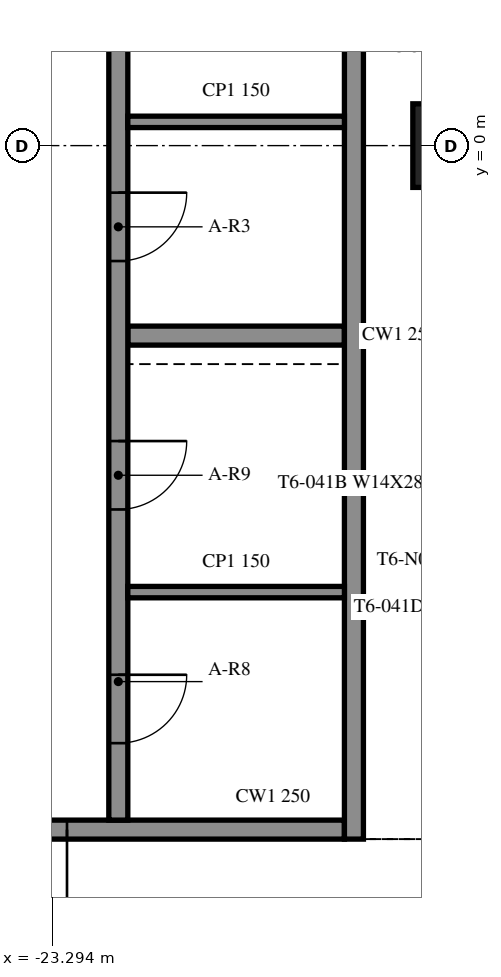
"""IFC4 building model, lengths in metres.
Left out: names, types, materials, properties, quantities, classifications, styles, units other than length and angle.
Written with IfcOpenShell. Run it as: python <this file> out.ifc"""

import sys

from ifc_helpers import new_model, si_unit, direction, frame, frame_2d, origin, origin_2d, place, context, subcontext, project, spatial, rectangle, extrude, element, fill, save


model = new_model("IFC4")
c1 = context("Model", 3, precision=1e-05, world=origin(), true_north=direction((0.0, 1.0)))
c2 = subcontext(c1, "Body", "Model", "MODEL_VIEW")
j1 = project(units=[si_unit("LENGTHUNIT", "METRE"), si_unit("PLANEANGLEUNIT", "RADIAN")], contexts=[c1])
p1 = place(None, origin())
s1 = spatial("IfcSite", under=j1, at=p1, CompositionType="ELEMENT")
p2 = place(p1, origin())
s2 = spatial("IfcBuilding", under=s1, at=p2, CompositionType="ELEMENT")
p3 = place(p2, frame((0.0, 0.0, 224.3)))
s3 = spatial("IfcBuildingStorey", under=s2, at=p3, CompositionType="ELEMENT", Elevation=224.3)
p4 = place(p3, frame((-18.0, 0.0, -0.4), z_axis=(0.0, 0.0, 1.0), x_axis=(1.0, 0.0, 0.0)))
e1 = element("IfcColumn", 1, at=p4, inside=s3, PredefinedType="COLUMN", context=c2, shape_type="SweptSolid", body=[
    extrude(rectangle(XDim=1.1, YDim=1.1, at=origin_2d()), origin(), (0.0, 0.0, 1.0), 4.36),
])
p5 = place(p3, frame((-19.325, -9.125, 0.0), z_axis=(0.0, 0.0, 1.0), x_axis=(0.0, 1.0, 0.0)))
e2 = element("IfcWall", 2, at=p5, inside=s3, PredefinedType="SOLIDWALL", context=c2, shape_type="SweptSolid", body=[
    extrude(rectangle(XDim=24.25, YDim=0.25, at=frame_2d((12.125, 0.0))), origin(), (0.0, 0.0, 1.0), 3.96),
])
p6 = place(p3, frame((-19.45, -9.0, 0.0), z_axis=(0.0, 0.0, 1.0), x_axis=(-1.0, 0.0, 0.0)))
e3 = element("IfcWall", 3, at=p6, inside=s3, PredefinedType="SOLIDWALL", context=c2, shape_type="SweptSolid", body=[
    extrude(rectangle(XDim=9.1, YDim=0.25, at=frame_2d((4.55, 0.0))), origin(), (0.0, 0.0, 1.0), 3.96),
])
p7 = place(p6, frame((3.65, 0.0, 0.0)))
e4 = element("IfcOpeningElement", 4, at=p7, cuts=e3, PredefinedType="OPENING", context=c2, shape_type="SweptSolid", body=[
    extrude(rectangle(XDim=1.8, YDim=2.1, at=frame_2d((0.9, 1.05))), frame((0.0, 0.135, 0.0), z_axis=(0.0, -1.0, 0.0), x_axis=(1.0, 0.0, 0.0)), (0.0, 0.0, 1.0), 0.27),
])
p8 = place(p3, frame((-22.425, 14.875, 0.0), z_axis=(0.0, 0.0, 1.0), x_axis=(0.0, -1.0, 0.0)))
e5 = element("IfcWall", 5, at=p8, inside=s3, PredefinedType="SOLIDWALL", context=c2, shape_type="SweptSolid", body=[
    extrude(rectangle(XDim=23.75, YDim=0.25, at=frame_2d((11.875, 0.0))), origin(), (0.0, 0.0, 1.0), 3.96),
])
p9 = place(p8, frame((15.494, 0.0, 0.0)))
e6 = element("IfcOpeningElement", 6, at=p9, cuts=e5, PredefinedType="OPENING", context=c2, shape_type="SweptSolid", body=[
    extrude(rectangle(XDim=0.9, YDim=2.1, at=frame_2d((0.45, 1.05))), frame((0.0, 0.135, 0.0), z_axis=(0.0, -1.0, 0.0), x_axis=(1.0, 0.0, 0.0)), (0.0, 0.0, 1.0), 0.27),
])
p10 = place(p8, frame((11.425, 0.0, 0.0)))
e7 = element("IfcOpeningElement", 7, at=p10, cuts=e5, PredefinedType="OPENING", context=c2, shape_type="SweptSolid", body=[
    extrude(rectangle(XDim=0.9, YDim=2.1, at=frame_2d((0.45, 1.05))), frame((0.0, 0.135, 0.0), z_axis=(0.0, -1.0, 0.0), x_axis=(1.0, 0.0, 0.0)), (0.0, 0.0, 1.0), 0.27),
])
p11 = place(p8, frame((7.356, 0.0, 0.0)))
e8 = element("IfcOpeningElement", 8, at=p11, cuts=e5, PredefinedType="OPENING", context=c2, shape_type="SweptSolid", body=[
    extrude(rectangle(XDim=0.9, YDim=2.1, at=frame_2d((0.45, 1.05))), frame((0.0, 0.135, 0.0), z_axis=(0.0, -1.0, 0.0), x_axis=(1.0, 0.0, 0.0)), (0.0, 0.0, 1.0), 0.27),
])
p12 = place(p8, frame((21.837, 0.0, 0.0)))
e9 = element("IfcOpeningElement", 9, at=p12, cuts=e5, PredefinedType="OPENING", context=c2, shape_type="SweptSolid", body=[
    extrude(rectangle(XDim=0.9, YDim=2.1, at=frame_2d((0.45, 1.05))), frame((0.0, 0.135, 0.0), z_axis=(0.0, -1.0, 0.0), x_axis=(1.0, 0.0, 0.0)), (0.0, 0.0, 1.0), 0.27),
])
p13 = place(p8, frame((18.762, 0.0, 0.0)))
e10 = element("IfcOpeningElement", 10, at=p13, cuts=e5, PredefinedType="OPENING", context=c2, shape_type="SweptSolid", body=[
    extrude(rectangle(XDim=0.9, YDim=2.1, at=frame_2d((0.45, 1.05))), frame((0.0, 0.135, 0.0), z_axis=(0.0, -1.0, 0.0), x_axis=(1.0, 0.0, 0.0)), (0.0, 0.0, 1.0), 0.27),
])
p14 = place(p8, frame((4.587, 0.0, 0.0)))
e11 = element("IfcOpeningElement", 11, at=p14, cuts=e5, PredefinedType="OPENING", context=c2, shape_type="SweptSolid", body=[
    extrude(rectangle(XDim=0.9, YDim=2.1, at=frame_2d((0.45, 1.05))), frame((0.0, 0.135, 0.0), z_axis=(0.0, -1.0, 0.0), x_axis=(1.0, 0.0, 0.0)), (0.0, 0.0, 1.0), 0.27),
])
p15 = place(p8, frame((2.55, 0.0, 0.0)))
e12 = element("IfcOpeningElement", 12, at=p15, cuts=e5, PredefinedType="OPENING", context=c2, shape_type="SweptSolid", body=[
    extrude(rectangle(XDim=0.9, YDim=2.1, at=frame_2d((0.45, 1.05))), frame((0.0, 0.135, 0.0), z_axis=(0.0, -1.0, 0.0), x_axis=(1.0, 0.0, 0.0)), (0.0, 0.0, 1.0), 0.27),
])
p16 = place(p8, frame((0.512, 0.0, 0.0)))
e13 = element("IfcOpeningElement", 13, at=p16, cuts=e5, PredefinedType="OPENING", context=c2, shape_type="SweptSolid", body=[
    extrude(rectangle(XDim=0.9, YDim=2.1, at=frame_2d((0.45, 1.05))), frame((0.0, 0.135, 0.0), z_axis=(0.0, -1.0, 0.0), x_axis=(1.0, 0.0, 0.0)), (0.0, 0.0, 1.0), 0.27),
])
p17 = place(p3, frame((-22.3, -2.5, 0.0), z_axis=(0.0, 0.0, 1.0), x_axis=(1.0, 0.0, 0.0)))
e14 = element("IfcWall", 14, at=p17, inside=s3, PredefinedType="SOLIDWALL", context=c2, shape_type="SweptSolid", body=[
    extrude(rectangle(XDim=2.85, YDim=0.25, at=frame_2d((1.425, 0.0))), origin(), (0.0, 0.0, 1.0), 3.96),
])
for number, where, z_axis, x_axis in (
    (15, (-22.3, 0.312, 0.0), (0.0, 0.0, 1.0), (1.0, 0.0, 0.0)),
    (16, (-22.3, -5.875, 0.0), (0.0, 0.0, 1.0), (1.0, 0.0, 0.0)),
):
    element("IfcWall", number, at=place(p3, frame(where, z_axis=z_axis, x_axis=x_axis)), inside=s3, PredefinedType="PARTITIONING", context=c2, shape_type="SweptSolid", body=[
        extrude(rectangle(XDim=2.85, YDim=0.15, at=frame_2d((1.425, 0.0))), origin(), (0.0, 0.0, 1.0), 3.96),
    ])
p18 = place(p7, origin())
e17 = element("IfcDoor", 17, at=p18, inside=s3, OperationType="DOUBLE_DOOR_SINGLE_SWING", PredefinedType="DOOR", context=c2, shape_type="SweptSolid", body=[
    extrude(rectangle(XDim=1.8, YDim=2.1, at=frame_2d((0.9, 1.05))), frame((0.0, 0.025, 0.0), z_axis=(0.0, -1.0, 0.0), x_axis=(1.0, 0.0, 0.0)), (0.0, 0.0, 1.0), 0.05),
])
fill(e4, e17)
p19 = place(p9, origin())
e18 = element("IfcDoor", 18, at=p19, inside=s3, OperationType="SINGLE_SWING_LEFT", PredefinedType="DOOR", context=c2, shape_type="SweptSolid", body=[
    extrude(rectangle(XDim=0.9, YDim=2.1, at=frame_2d((0.45, 1.05))), frame((0.0, 0.025, 0.0), z_axis=(0.0, -1.0, 0.0), x_axis=(1.0, 0.0, 0.0)), (0.0, 0.0, 1.0), 0.05),
])
fill(e6, e18)
p20 = place(p12, origin())
e19 = element("IfcDoor", 19, at=p20, inside=s3, OperationType="SINGLE_SWING_RIGHT", PredefinedType="DOOR", context=c2, shape_type="SweptSolid", body=[
    extrude(rectangle(XDim=0.9, YDim=2.1, at=frame_2d((0.45, 1.05))), frame((0.0, 0.025, 0.0), z_axis=(0.0, -1.0, 0.0), x_axis=(1.0, 0.0, 0.0)), (0.0, 0.0, 1.0), 0.05),
])
fill(e9, e19)
p21 = place(p13, origin())
e20 = element("IfcDoor", 20, at=p21, inside=s3, OperationType="SINGLE_SWING_LEFT", PredefinedType="DOOR", context=c2, shape_type="SweptSolid", body=[
    extrude(rectangle(XDim=0.9, YDim=2.1, at=frame_2d((0.45, 1.05))), frame((0.0, 0.025, 0.0), z_axis=(0.0, -1.0, 0.0), x_axis=(1.0, 0.0, 0.0)), (0.0, 0.0, 1.0), 0.05),
])
fill(e10, e20)
save(model, sys.argv[1])
